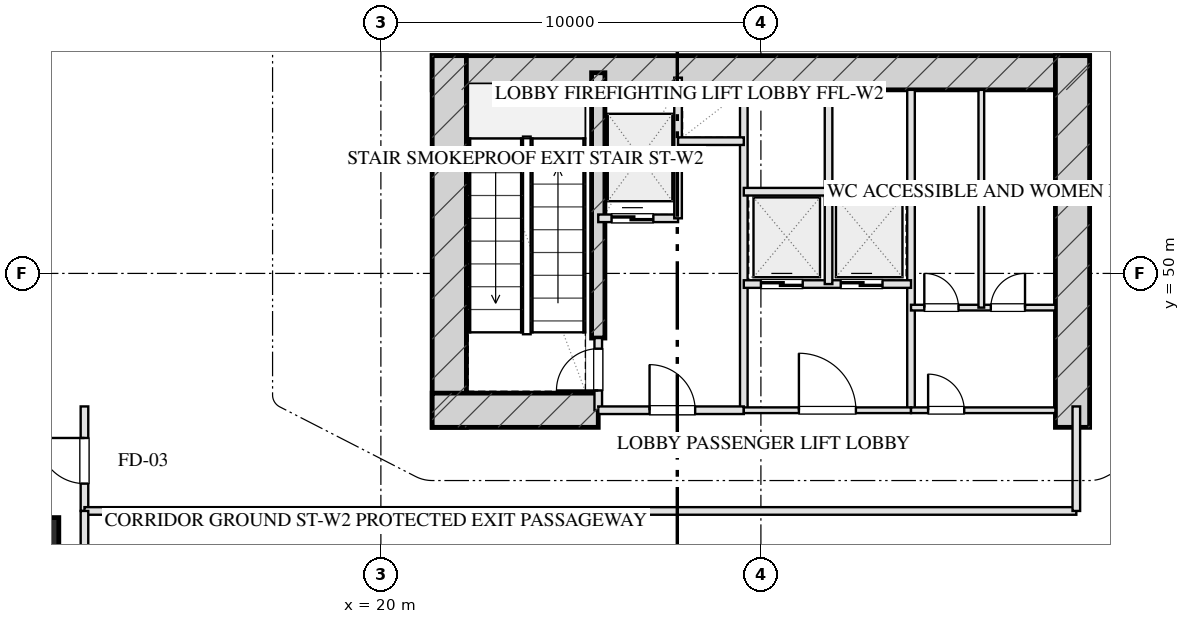
"""IFC4 building model, lengths in metres.
Left out: names, types, materials, properties, quantities, classifications, styles, units other than length and angle.
Written with IfcOpenShell. Run it as: python <this file> out.ifc"""

import sys

from ifc_helpers import new_model, si_unit, direction, frame, frame_2d, origin, origin_2d, place, context, subcontext, project, spatial, rectangle, hollow_rectangle, extrude, element, fill, save


model = new_model("IFC4")
c1 = context("Model", 3, precision=1e-05, world=origin(), true_north=direction((0.0, 1.0)))
c2 = subcontext(c1, "Body", "Model", "MODEL_VIEW")
j1 = project(units=[si_unit("LENGTHUNIT", "METRE"), si_unit("PLANEANGLEUNIT", "RADIAN")], contexts=[c1])
p1 = place(None, origin())
s1 = spatial("IfcSite", under=j1, at=p1, CompositionType="ELEMENT")
p2 = place(p1, origin())
s2 = spatial("IfcBuilding", under=s1, at=p2, CompositionType="ELEMENT")
p3 = place(p2, origin())
s3 = spatial("IfcBuildingStorey", under=s2, at=p3, CompositionType="ELEMENT", Elevation=0.0)
p4 = place(p3, frame((21.35, 55.28, 0.0), z_axis=(0.0, 0.0, 1.0), x_axis=(1.0, 0.0, 0.0)))
e1 = element("IfcWall", 1, at=p4, inside=s3, PredefinedType="SHEAR", context=c2, shape_type="SweptSolid", body=[
    extrude(rectangle(XDim=17.3, YDim=0.9, at=frame_2d((8.65, 0.0))), origin(), (0.0, 0.0, 1.0), 6.0),
])
for number, where, z_axis, x_axis in (
    (2, (21.8, 45.95, 0.0), (0.0, 0.0, 1.0), (0.0, 1.0, 0.0)),
    (3, (38.2, 45.95, 0.0), (0.0, 0.0, 1.0), (0.0, 1.0, 0.0)),
):
    element("IfcWall", number, at=place(p3, frame(where, z_axis=z_axis, x_axis=x_axis)), inside=s3, PredefinedType="SHEAR", context=c2, shape_type="SweptSolid", body=[
        extrude(rectangle(XDim=9.78, YDim=0.9, at=frame_2d((4.89, 0.0))), origin(), (0.0, 0.0, 1.0), 6.0),
    ])
p5 = place(p3, frame((25.72, 48.3, 0.0), z_axis=(0.0, 0.0, 1.0), x_axis=(0.0, 1.0, 0.0)))
e4 = element("IfcWall", 4, at=p5, inside=s3, PredefinedType="SHEAR", context=c2, shape_type="SweptSolid", body=[
    extrude(rectangle(XDim=6.98, YDim=0.35, at=frame_2d((3.49, 0.0))), origin(), (0.0, 0.0, 1.0), 6.0),
])
p6 = place(p3, frame((21.35, 46.4, 0.0), z_axis=(0.0, 0.0, 1.0), x_axis=(1.0, 0.0, 0.0)))
e5 = element("IfcWall", 5, at=p6, inside=s3, PredefinedType="SHEAR", context=c2, shape_type="SweptSolid", body=[
    extrude(rectangle(XDim=4.37, YDim=0.9, at=frame_2d((2.185, 0.0))), origin(), (0.0, 0.0, 1.0), 6.0),
])
p7 = place(p3, frame((10.95, 43.0, 0.0), z_axis=(0.0, 0.0, 1.0), x_axis=(1.0, 0.0, 0.0)))
e6 = element("IfcColumn", 6, at=p7, inside=s3, PredefinedType="COLUMN", context=c2, shape_type="SweptSolid", body=[
    extrude(hollow_rectangle(XDim=1.15, YDim=1.15, WallThickness=0.04, at=origin_2d()), origin(), (0.0, 0.0, 1.0), 6.001),
])
p8 = place(p3, frame((25.72, 46.4, 0.0), z_axis=(0.0, 0.0, 1.0), x_axis=(0.0, 1.0, 0.0)))
e7 = element("IfcWall", 7, at=p8, inside=s3, PredefinedType="PARTITIONING", context=c2, shape_type="SweptSolid", body=[
    extrude(rectangle(XDim=1.9, YDim=0.2, at=frame_2d((0.95, 0.0))), origin(), (0.0, 0.0, 1.0), 5.685),
])
p9 = place(p8, frame((0.52, 0.0, 0.0)))
e8 = element("IfcOpeningElement", 8, at=p9, cuts=e7, PredefinedType="OPENING", context=c2, shape_type="SweptSolid", body=[
    extrude(rectangle(XDim=1.1, YDim=2.05, at=frame_2d((0.55, 1.025))), frame((0.0, 0.11, 0.0), z_axis=(0.0, -1.0, 0.0), x_axis=(1.0, 0.0, 0.0)), (0.0, 0.0, 1.0), 0.22),
])
p10 = place(p3, frame((29.55, 46.4, 0.0), z_axis=(0.0, 0.0, 1.0), x_axis=(0.0, 1.0, 0.0)))
e9 = element("IfcWall", 9, at=p10, inside=s3, PredefinedType="PARTITIONING", context=c2, shape_type="SweptSolid", body=[
    extrude(rectangle(XDim=8.43, YDim=0.2, at=frame_2d((4.215, 0.0))), origin(), (0.0, 0.0, 1.0), 5.685),
])
p11 = place(p3, frame((25.72, 46.4, 0.0), z_axis=(0.0, 0.0, 1.0), x_axis=(1.0, 0.0, 0.0)))
e10 = element("IfcWall", 10, at=p11, inside=s3, PredefinedType="PARTITIONING", context=c2, shape_type="SweptSolid", body=[
    extrude(rectangle(XDim=3.83, YDim=0.2, at=frame_2d((1.915, 0.0))), origin(), (0.0, 0.0, 1.0), 5.685),
])
p12 = place(p11, frame((1.35, 0.0, 0.0)))
e11 = element("IfcOpeningElement", 11, at=p12, cuts=e10, PredefinedType="OPENING", context=c2, shape_type="SweptSolid", body=[
    extrude(rectangle(XDim=1.2, YDim=2.05, at=frame_2d((0.6, 1.025))), frame((0.0, 0.11, 0.0), z_axis=(0.0, -1.0, 0.0), x_axis=(1.0, 0.0, 0.0)), (0.0, 0.0, 1.0), 0.22),
])
p13 = place(p3, frame((25.72, 51.45, 0.0), z_axis=(0.0, 0.0, 1.0), x_axis=(1.0, 0.0, 0.0)))
e12 = element("IfcWall", 12, at=p13, inside=s3, PredefinedType="PARTITIONING", context=c2, shape_type="SweptSolid", body=[
    extrude(rectangle(XDim=2.1, YDim=0.2, at=frame_2d((1.05, 0.0))), origin(), (0.0, 0.0, 1.0), 5.685),
])
p14 = place(p13, frame((0.35, 0.0, 0.0)))
e13 = element("IfcOpeningElement", 13, at=p14, cuts=e12, PredefinedType="OPENING", context=c2, shape_type="SweptSolid", body=[
    extrude(rectangle(XDim=1.1, YDim=2.05, at=frame_2d((0.55, 1.025))), frame((0.0, 0.11, 0.0), z_axis=(0.0, -1.0, 0.0), x_axis=(1.0, 0.0, 0.0)), (0.0, 0.0, 1.0), 0.22),
])
p15 = place(p3, frame((27.82, 51.45, 0.0), z_axis=(0.0, 0.0, 1.0), x_axis=(0.0, 1.0, 0.0)))
e14 = element("IfcWall", 14, at=p15, inside=s3, PredefinedType="PARTITIONING", context=c2, shape_type="SweptSolid", body=[
    extrude(rectangle(XDim=3.7, YDim=0.2, at=frame_2d((1.85, 0.0))), origin(), (0.0, 0.0, 1.0), 5.685),
])
p16 = place(p3, frame((27.82, 53.48, 0.0), z_axis=(0.0, 0.0, 1.0), x_axis=(1.0, 0.0, 0.0)))
e15 = element("IfcWall", 15, at=p16, inside=s3, PredefinedType="PARTITIONING", context=c2, shape_type="SweptSolid", body=[
    extrude(rectangle(XDim=1.73, YDim=0.2, at=frame_2d((0.865, 0.0))), origin(), (0.0, 0.0, 1.0), 5.685),
])
p17 = place(p3, frame((33.95, 46.4, 0.0), z_axis=(0.0, 0.0, 1.0), x_axis=(0.0, 1.0, 0.0)))
e16 = element("IfcWall", 16, at=p17, inside=s3, PredefinedType="PARTITIONING", context=c2, shape_type="SweptSolid", body=[
    extrude(rectangle(XDim=8.43, YDim=0.2, at=frame_2d((4.215, 0.0))), origin(), (0.0, 0.0, 1.0), 5.685),
])
p18 = place(p3, frame((29.55, 46.4, 0.0), z_axis=(0.0, 0.0, 1.0), x_axis=(1.0, 0.0, 0.0)))
e17 = element("IfcWall", 17, at=p18, inside=s3, PredefinedType="PARTITIONING", context=c2, shape_type="SweptSolid", body=[
    extrude(rectangle(XDim=4.4, YDim=0.15, at=frame_2d((2.2, 0.0))), origin(), (0.0, 0.0, 1.0), 5.685),
])
p19 = place(p18, frame((1.45, 0.0, 0.0)))
e18 = element("IfcOpeningElement", 18, at=p19, cuts=e17, PredefinedType="OPENING", context=c2, shape_type="SweptSolid", body=[
    extrude(rectangle(XDim=1.5, YDim=2.05, at=frame_2d((0.75, 1.025))), frame((0.0, 0.085, 0.0), z_axis=(0.0, -1.0, 0.0), x_axis=(1.0, 0.0, 0.0)), (0.0, 0.0, 1.0), 0.17),
])
p20 = place(p3, frame((29.55, 49.72, 0.0), z_axis=(0.0, 0.0, 1.0), x_axis=(1.0, 0.0, 0.0)))
e19 = element("IfcWall", 19, at=p20, inside=s3, PredefinedType="PARTITIONING", context=c2, shape_type="SweptSolid", body=[
    extrude(rectangle(XDim=4.4, YDim=0.2, at=frame_2d((2.2, 0.0))), origin(), (0.0, 0.0, 1.0), 5.685),
])
p21 = place(p20, frame((0.45, 0.0, 0.0)))
e20 = element("IfcOpeningElement", 20, at=p21, cuts=e19, PredefinedType="OPENING", context=c2, shape_type="SweptSolid", body=[
    extrude(rectangle(XDim=1.1, YDim=2.05, at=frame_2d((0.55, 1.025))), frame((0.0, 0.11, 0.0), z_axis=(0.0, -1.0, 0.0), x_axis=(1.0, 0.0, 0.0)), (0.0, 0.0, 1.0), 0.22),
])
p22 = place(p20, frame((2.55, 0.0, 0.0)))
e21 = element("IfcOpeningElement", 21, at=p22, cuts=e19, PredefinedType="OPENING", context=c2, shape_type="SweptSolid", body=[
    extrude(rectangle(XDim=1.1, YDim=2.05, at=frame_2d((0.55, 1.025))), frame((0.0, 0.11, 0.0), z_axis=(0.0, -1.0, 0.0), x_axis=(1.0, 0.0, 0.0)), (0.0, 0.0, 1.0), 0.22),
])
p23 = place(p3, frame((31.78, 49.72, 0.0), z_axis=(0.0, 0.0, 1.0), x_axis=(0.0, 1.0, 0.0)))
e22 = element("IfcWall", 22, at=p23, inside=s3, PredefinedType="PARTITIONING", context=c2, shape_type="SweptSolid", body=[
    extrude(rectangle(XDim=5.11, YDim=0.2, at=frame_2d((2.555, 0.0))), origin(), (0.0, 0.0, 1.0), 5.685),
])
p24 = place(p3, frame((29.55, 52.15, 0.0), z_axis=(0.0, 0.0, 1.0), x_axis=(1.0, 0.0, 0.0)))
e23 = element("IfcWall", 23, at=p24, inside=s3, PredefinedType="PARTITIONING", context=c2, shape_type="SweptSolid", body=[
    extrude(rectangle(XDim=4.4, YDim=0.2, at=frame_2d((2.2, 0.0))), origin(), (0.0, 0.0, 1.0), 5.685),
])
p25 = place(p3, frame((33.95, 46.4, 0.0), z_axis=(0.0, 0.0, 1.0), x_axis=(1.0, 0.0, 0.0)))
e24 = element("IfcWall", 24, at=p25, inside=s3, PredefinedType="PARTITIONING", context=c2, shape_type="SweptSolid", body=[
    extrude(rectangle(XDim=3.8, YDim=0.15, at=frame_2d((1.9, 0.0))), origin(), (0.0, 0.0, 1.0), 5.685),
])
p26 = place(p25, frame((0.45, 0.0, 0.0)))
e25 = element("IfcOpeningElement", 25, at=p26, cuts=e24, PredefinedType="OPENING", context=c2, shape_type="SweptSolid", body=[
    extrude(rectangle(XDim=0.95, YDim=2.05, at=frame_2d((0.475, 1.025))), frame((0.0, 0.085, 0.0), z_axis=(0.0, -1.0, 0.0), x_axis=(1.0, 0.0, 0.0)), (0.0, 0.0, 1.0), 0.17),
])
p27 = place(p3, frame((33.95, 49.1, 0.0), z_axis=(0.0, 0.0, 1.0), x_axis=(1.0, 0.0, 0.0)))
e26 = element("IfcWall", 26, at=p27, inside=s3, PredefinedType="PARTITIONING", context=c2, shape_type="SweptSolid", body=[
    extrude(rectangle(XDim=3.8, YDim=0.15, at=frame_2d((1.9, 0.0))), origin(), (0.0, 0.0, 1.0), 5.685),
])
p28 = place(p27, frame((0.35, 0.0, 0.0)))
e27 = element("IfcOpeningElement", 27, at=p28, cuts=e26, PredefinedType="OPENING", context=c2, shape_type="SweptSolid", body=[
    extrude(rectangle(XDim=0.9, YDim=2.05, at=frame_2d((0.45, 1.025))), frame((0.0, 0.085, 0.0), z_axis=(0.0, -1.0, 0.0), x_axis=(1.0, 0.0, 0.0)), (0.0, 0.0, 1.0), 0.17),
])
p29 = place(p27, frame((2.1, 0.0, 0.0)))
e28 = element("IfcOpeningElement", 28, at=p29, cuts=e26, PredefinedType="OPENING", context=c2, shape_type="SweptSolid", body=[
    extrude(rectangle(XDim=0.9, YDim=2.05, at=frame_2d((0.45, 1.025))), frame((0.0, 0.085, 0.0), z_axis=(0.0, -1.0, 0.0), x_axis=(1.0, 0.0, 0.0)), (0.0, 0.0, 1.0), 0.17),
])
p30 = place(p3, frame((35.8, 49.1, 0.0), z_axis=(0.0, 0.0, 1.0), x_axis=(0.0, 1.0, 0.0)))
e29 = element("IfcWall", 29, at=p30, inside=s3, PredefinedType="PARTITIONING", context=c2, shape_type="SweptSolid", body=[
    extrude(rectangle(XDim=5.73, YDim=0.15, at=frame_2d((2.865, 0.0))), origin(), (0.0, 0.0, 1.0), 5.685),
])
p31 = place(p3, frame((12.2, 43.75, 0.0), z_axis=(0.0, 0.0, 1.0), x_axis=(0.0, 1.0, 0.0)))
e30 = element("IfcWall", 30, at=p31, inside=s3, PredefinedType="PARTITIONING", context=c2, shape_type="SweptSolid", body=[
    extrude(rectangle(XDim=2.75, YDim=0.2, at=frame_2d((1.375, 0.0))), origin(), (0.0, 0.0, 1.0), 5.685),
])
p32 = place(p31, frame((0.72, 0.0, 0.0)))
e31 = element("IfcOpeningElement", 31, at=p32, cuts=e30, PredefinedType="OPENING", context=c2, shape_type="SweptSolid", body=[
    extrude(rectangle(XDim=1.2, YDim=2.05, at=frame_2d((0.6, 1.025))), frame((0.0, 0.11, 0.0), z_axis=(0.0, -1.0, 0.0), x_axis=(1.0, 0.0, 0.0)), (0.0, 0.0, 1.0), 0.22),
])
p33 = place(p3, frame((12.2, 43.75, 0.0), z_axis=(0.0, 0.0, 1.0), x_axis=(1.0, 0.0, 0.0)))
e32 = element("IfcWall", 32, at=p33, inside=s3, PredefinedType="PARTITIONING", context=c2, shape_type="SweptSolid", body=[
    extrude(rectangle(XDim=26.1, YDim=0.2, at=frame_2d((13.05, 0.0))), origin(), (0.0, 0.0, 1.0), 5.685),
])
p34 = place(p3, frame((38.3, 43.75, 0.0), z_axis=(0.0, 0.0, 1.0), x_axis=(0.0, 1.0, 0.0)))
e33 = element("IfcWall", 33, at=p34, inside=s3, PredefinedType="PARTITIONING", context=c2, shape_type="SweptSolid", body=[
    extrude(rectangle(XDim=2.75, YDim=0.2, at=frame_2d((1.375, 0.0))), origin(), (0.0, 0.0, 1.0), 5.685),
])
p35 = place(p3, frame((12.2, 24.25, 0.0), z_axis=(0.0, 0.0, 1.0), x_axis=(0.0, 1.0, 0.0)))
e34 = element("IfcWall", 34, at=p35, inside=s3, PredefinedType="PARTITIONING", context=c2, shape_type="SweptSolid", body=[
    extrude(rectangle(XDim=19.5, YDim=0.2, at=frame_2d((9.75, 0.0))), origin(), (0.0, 0.0, 1.0), 5.685),
])
p36 = place(p35, frame((4.65, 0.0, 0.0)))
e35 = element("IfcOpeningElement", 35, at=p36, cuts=e34, PredefinedType="OPENING", context=c2, shape_type="SweptSolid", body=[
    extrude(rectangle(XDim=1.8, YDim=2.05, at=frame_2d((0.9, 1.025))), frame((0.0, 0.11, 0.0), z_axis=(0.0, -1.0, 0.0), x_axis=(1.0, 0.0, 0.0)), (0.0, 0.0, 1.0), 0.22),
])
p37 = place(p9, origin())
e36 = element("IfcDoor", 36, at=p37, inside=s3, OperationType="SINGLE_SWING_LEFT", PredefinedType="DOOR", context=c2, shape_type="SweptSolid", body=[
    extrude(rectangle(XDim=1.1, YDim=2.05, at=frame_2d((0.55, 1.025))), frame((0.0, 0.025, 0.0), z_axis=(0.0, -1.0, 0.0), x_axis=(1.0, 0.0, 0.0)), (0.0, 0.0, 1.0), 0.05),
])
fill(e8, e36)
p38 = place(p12, origin())
e37 = element("IfcDoor", 37, at=p38, inside=s3, OperationType="SINGLE_SWING_LEFT", PredefinedType="DOOR", context=c2, shape_type="SweptSolid", body=[
    extrude(rectangle(XDim=1.2, YDim=2.05, at=frame_2d((0.6, 1.025))), frame((0.0, 0.025, 0.0), z_axis=(0.0, -1.0, 0.0), x_axis=(1.0, 0.0, 0.0)), (0.0, 0.0, 1.0), 0.05),
])
fill(e11, e37)
p39 = place(p14, origin())
e38 = element("IfcDoor", 38, at=p39, inside=s3, OperationType="DOUBLE_DOOR_SLIDING", PredefinedType="DOOR", context=c2, shape_type="SweptSolid", body=[
    extrude(rectangle(XDim=1.1, YDim=2.05, at=frame_2d((0.55, 1.025))), frame((0.0, 0.025, 0.0), z_axis=(0.0, -1.0, 0.0), x_axis=(1.0, 0.0, 0.0)), (0.0, 0.0, 1.0), 0.05),
])
fill(e13, e38)
p40 = place(p19, origin())
e39 = element("IfcDoor", 39, at=p40, inside=s3, OperationType="SINGLE_SWING_LEFT", PredefinedType="DOOR", context=c2, shape_type="SweptSolid", body=[
    extrude(rectangle(XDim=1.5, YDim=2.05, at=frame_2d((0.75, 1.025))), frame((0.0, 0.025, 0.0), z_axis=(0.0, -1.0, 0.0), x_axis=(1.0, 0.0, 0.0)), (0.0, 0.0, 1.0), 0.05),
])
fill(e18, e39)
p41 = place(p21, origin())
e40 = element("IfcDoor", 40, at=p41, inside=s3, OperationType="DOUBLE_DOOR_SLIDING", PredefinedType="DOOR", context=c2, shape_type="SweptSolid", body=[
    extrude(rectangle(XDim=1.1, YDim=2.05, at=frame_2d((0.55, 1.025))), frame((0.0, 0.025, 0.0), z_axis=(0.0, -1.0, 0.0), x_axis=(1.0, 0.0, 0.0)), (0.0, 0.0, 1.0), 0.05),
])
fill(e20, e40)
p42 = place(p22, origin())
e41 = element("IfcDoor", 41, at=p42, inside=s3, OperationType="DOUBLE_DOOR_SLIDING", PredefinedType="DOOR", context=c2, shape_type="SweptSolid", body=[
    extrude(rectangle(XDim=1.1, YDim=2.05, at=frame_2d((0.55, 1.025))), frame((0.0, 0.025, 0.0), z_axis=(0.0, -1.0, 0.0), x_axis=(1.0, 0.0, 0.0)), (0.0, 0.0, 1.0), 0.05),
])
fill(e21, e41)
p43 = place(p26, origin())
e42 = element("IfcDoor", 42, at=p43, inside=s3, OperationType="SINGLE_SWING_LEFT", PredefinedType="DOOR", context=c2, shape_type="SweptSolid", body=[
    extrude(rectangle(XDim=0.95, YDim=2.05, at=frame_2d((0.475, 1.025))), frame((0.0, 0.025, 0.0), z_axis=(0.0, -1.0, 0.0), x_axis=(1.0, 0.0, 0.0)), (0.0, 0.0, 1.0), 0.05),
])
fill(e25, e42)
p44 = place(p28, origin())
e43 = element("IfcDoor", 43, at=p44, inside=s3, OperationType="SINGLE_SWING_LEFT", PredefinedType="DOOR", context=c2, shape_type="SweptSolid", body=[
    extrude(rectangle(XDim=0.9, YDim=2.05, at=frame_2d((0.45, 1.025))), frame((0.0, 0.025, 0.0), z_axis=(0.0, -1.0, 0.0), x_axis=(1.0, 0.0, 0.0)), (0.0, 0.0, 1.0), 0.05),
])
fill(e27, e43)
p45 = place(p29, origin())
e44 = element("IfcDoor", 44, at=p45, inside=s3, OperationType="SINGLE_SWING_RIGHT", PredefinedType="DOOR", context=c2, shape_type="SweptSolid", body=[
    extrude(rectangle(XDim=0.9, YDim=2.05, at=frame_2d((0.45, 1.025))), frame((0.0, 0.025, 0.0), z_axis=(0.0, -1.0, 0.0), x_axis=(1.0, 0.0, 0.0)), (0.0, 0.0, 1.0), 0.05),
])
fill(e28, e44)
p46 = place(p32, origin())
e45 = element("IfcDoor", 45, at=p46, inside=s3, OperationType="SINGLE_SWING_RIGHT", PredefinedType="DOOR", context=c2, shape_type="SweptSolid", body=[
    extrude(rectangle(XDim=1.2, YDim=2.05, at=frame_2d((0.6, 1.025))), frame((0.0, 0.025, 0.0), z_axis=(0.0, -1.0, 0.0), x_axis=(1.0, 0.0, 0.0)), (0.0, 0.0, 1.0), 0.05),
])
fill(e31, e45)
save(model, sys.argv[1])
